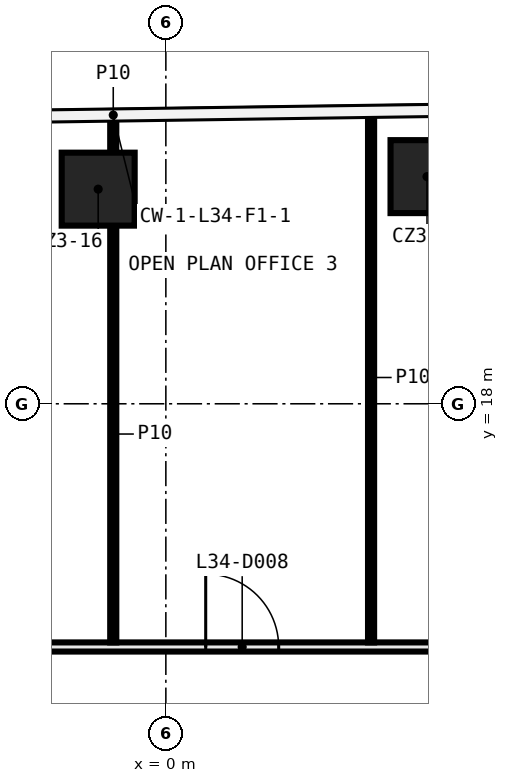
"""IFC4 building model, lengths in metres.
Left out: names, types, materials, properties, quantities, classifications, styles, units other than length and angle.
Written with IfcOpenShell. Run it as: python <this file> out.ifc"""

import sys

from ifc_helpers import new_model, si_unit, direction, frame, frame_2d, origin, origin_2d, place, context, subcontext, project, spatial, rectangle, extrude, element, fill, save


model = new_model("IFC4")
c1 = context("Model", 3, precision=1e-05, world=origin(), true_north=direction((0.0, 1.0)))
c2 = subcontext(c1, "Body", "Model", "MODEL_VIEW")
j1 = project(units=[si_unit("LENGTHUNIT", "METRE"), si_unit("PLANEANGLEUNIT", "RADIAN")], contexts=[c1])
p1 = place(None, origin())
s1 = spatial("IfcSite", under=j1, at=p1, CompositionType="ELEMENT")
p2 = place(p1, origin())
s2 = spatial("IfcBuilding", under=s1, at=p2, CompositionType="ELEMENT")
p3 = place(p2, frame((0.0, 0.0, 158.6)))
s3 = spatial("IfcBuildingStorey", under=s2, at=p3, CompositionType="ELEMENT", Elevation=158.6)
for number, where, z_axis, x_axis in (
    (1, (-1.113, 21.53, 0.0), (0.0, 0.0, 1.0), (1.0, 0.0, 0.0)),
    (2, (4.295, 21.736, 0.0), (0.0, 0.0, 1.0), (1.0, 0.0, 0.0)),
):
    element("IfcColumn", number, at=place(p3, frame(where, z_axis=z_axis, x_axis=x_axis)), inside=s3, PredefinedType="COLUMN", context=c2, shape_type="SweptSolid", body=[
        extrude(rectangle(XDim=1.2, YDim=1.2, at=origin_2d()), origin(), (0.0, 0.0, 1.0), 3.82),
    ])
p4 = place(p3, frame((-9.075, 14.0, 0.0), z_axis=(0.0, 0.0, 1.0), x_axis=(1.0, 0.0, 0.0)))
e3 = element("IfcWall", 3, at=p4, inside=s3, PredefinedType="PARTITIONING", context=c2, shape_type="SweptSolid", body=[
    extrude(rectangle(XDim=25.489, YDim=0.15, at=frame_2d((12.745, 0.0))), origin(), (0.0, 0.0, 1.0), 3.82),
])
p5 = place(p4, frame((13.965, 0.0, 0.0)))
e4 = element("IfcOpeningElement", 4, at=p5, cuts=e3, PredefinedType="OPENING", context=c2, shape_type="SweptSolid", body=[
    extrude(rectangle(XDim=1.2, YDim=2.1, at=frame_2d((0.6, 1.05))), frame((0.0, 0.085, 0.0), z_axis=(0.0, -1.0, 0.0), x_axis=(1.0, 0.0, 0.0)), (0.0, 0.0, 1.0), 0.17),
])
p6 = place(p4, frame((9.73, 0.0, 0.0)))
e5 = element("IfcOpeningElement", 5, at=p6, cuts=e3, PredefinedType="OPENING", context=c2, shape_type="SweptSolid", body=[
    extrude(rectangle(XDim=1.2, YDim=2.1, at=frame_2d((0.6, 1.05))), frame((0.0, 0.085, 0.0), z_axis=(0.0, -1.0, 0.0), x_axis=(1.0, 0.0, 0.0)), (0.0, 0.0, 1.0), 0.17),
])
p7 = place(p4, frame((5.49, 0.0, 0.0)))
e6 = element("IfcOpeningElement", 6, at=p7, cuts=e3, PredefinedType="OPENING", context=c2, shape_type="SweptSolid", body=[
    extrude(rectangle(XDim=1.2, YDim=2.1, at=frame_2d((0.6, 1.05))), frame((0.0, 0.085, 0.0), z_axis=(0.0, -1.0, 0.0), x_axis=(1.0, 0.0, 0.0)), (0.0, 0.0, 1.0), 0.17),
])
p8 = place(p3, frame((3.375, 14.075, 0.0), z_axis=(0.0, 0.0, 1.0), x_axis=(0.0, 1.0, 0.0)))
e7 = element("IfcWall", 7, at=p8, inside=s3, PredefinedType="PARTITIONING", context=c2, shape_type="SweptSolid", body=[
    extrude(rectangle(XDim=8.715, YDim=0.1, at=frame_2d((4.357, 0.0))), origin(), (0.0, 0.0, 1.0), 3.82),
])
p9 = place(p3, frame((-0.865, 14.075, 0.0), z_axis=(0.0, 0.0, 1.0), x_axis=(0.0, 1.0, 0.0)))
e8 = element("IfcWall", 8, at=p9, inside=s3, PredefinedType="PARTITIONING", context=c2, shape_type="SweptSolid", body=[
    extrude(rectangle(XDim=6.855, YDim=0.1, at=frame_2d((3.427, 0.0))), origin(), (0.0, 0.0, 1.0), 3.82),
])
p10 = place(p3, frame((-0.865, 22.13, 0.0), z_axis=(0.0, 0.0, 1.0), x_axis=(0.0, 1.0, 0.0)))
e9 = element("IfcWall", 9, at=p10, inside=s3, PredefinedType="PARTITIONING", context=c2, shape_type="SweptSolid", body=[
    extrude(rectangle(XDim=0.599, YDim=0.1, at=frame_2d((0.3, 0.0))), origin(), (0.0, 0.0, 1.0), 3.82),
])
p11 = place(p6, origin())
e10 = element("IfcDoor", 10, at=p11, inside=s3, OperationType="SINGLE_SWING_LEFT", PredefinedType="DOOR", context=c2, shape_type="SweptSolid", body=[
    extrude(rectangle(XDim=1.2, YDim=2.1, at=frame_2d((0.6, 1.05))), frame((0.0, 0.025, 0.0), z_axis=(0.0, -1.0, 0.0), x_axis=(1.0, 0.0, 0.0)), (0.0, 0.0, 1.0), 0.05),
])
fill(e5, e10)
save(model, sys.argv[1])
